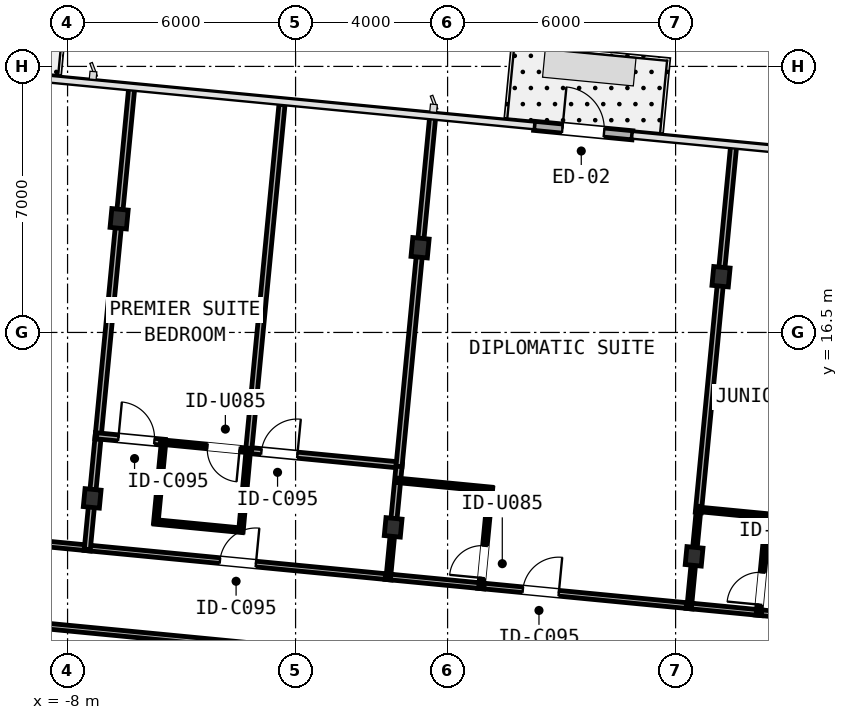
"""IFC4 building model, lengths in metres.
Left out: names, types, materials, properties, quantities, classifications, styles, units other than length and angle.
Written with IfcOpenShell. Run it as: python <this file> out.ifc"""

import sys

from ifc_helpers import new_model, si_unit, direction, frame, frame_2d, origin, origin_2d, place, context, subcontext, project, spatial, rectangle, i_section, extrude, element, fill, save


model = new_model("IFC4")
c1 = context("Model", 3, precision=1e-05, world=origin(), true_north=direction((0.0, 1.0)))
c2 = subcontext(c1, "Body", "Model", "MODEL_VIEW")
j1 = project(units=[si_unit("LENGTHUNIT", "METRE"), si_unit("PLANEANGLEUNIT", "RADIAN")], contexts=[c1])
p1 = place(None, origin())
s1 = spatial("IfcSite", under=j1, at=p1, CompositionType="ELEMENT")
p2 = place(p1, origin())
s2 = spatial("IfcBuilding", under=s1, at=p2, CompositionType="ELEMENT")
p3 = place(p2, frame((0.0, 0.0, 139.35)))
s3 = spatial("IfcBuildingStorey", under=s2, at=p3, CompositionType="ELEMENT", Elevation=139.35)
p4 = place(p3, frame((-7.352, 12.134, 0.0), z_axis=(0.0, 0.0, 1.0), x_axis=(0.995396198367, -0.09584575252, 0.0)))
e1 = element("IfcColumn", 1, at=p4, inside=s3, PredefinedType="COLUMN", context=c2, shape_type="SweptSolid", body=[
    extrude(i_section(OverallWidth=0.424, OverallDepth=0.474, WebThickness=0.048, FlangeThickness=0.077, FilletRadius=0.031, at=origin_2d()), origin(), (0.0, 0.0, 1.0), 3.45),
])
p5 = place(p3, frame((-6.643, 19.492, 0.0), z_axis=(0.0, 0.0, 1.0), x_axis=(0.995396198367, -0.09584575252, 0.0)))
e2 = element("IfcColumn", 2, at=p5, inside=s3, PredefinedType="COLUMN", context=c2, shape_type="SweptSolid", body=[
    extrude(i_section(OverallWidth=0.432, OverallDepth=0.498, WebThickness=0.056, FlangeThickness=0.089, FilletRadius=0.031, at=origin_2d()), origin(), (0.0, 0.0, 1.0), 3.45),
])
p6 = place(p3, frame((0.568, 11.371, 0.0), z_axis=(0.0, 0.0, 1.0), x_axis=(0.995396198367, -0.09584575252, 0.0)))
e3 = element("IfcColumn", 3, at=p6, inside=s3, PredefinedType="COLUMN", context=c2, shape_type="SweptSolid", body=[
    extrude(i_section(OverallWidth=0.424, OverallDepth=0.474, WebThickness=0.048, FlangeThickness=0.077, FilletRadius=0.031, at=origin_2d()), origin(), (0.0, 0.0, 1.0), 3.45),
])
p7 = place(p3, frame((1.276, 18.729, 0.0), z_axis=(0.0, 0.0, 1.0), x_axis=(0.995396198367, -0.09584575252, 0.0)))
e4 = element("IfcColumn", 4, at=p7, inside=s3, PredefinedType="COLUMN", context=c2, shape_type="SweptSolid", body=[
    extrude(i_section(OverallWidth=0.432, OverallDepth=0.498, WebThickness=0.056, FlangeThickness=0.089, FilletRadius=0.031, at=origin_2d()), origin(), (0.0, 0.0, 1.0), 3.45),
])
p8 = place(p3, frame((8.487, 10.609, 0.0), z_axis=(0.0, 0.0, 1.0), x_axis=(0.995396198367, -0.09584575252, 0.0)))
e5 = element("IfcColumn", 5, at=p8, inside=s3, PredefinedType="COLUMN", context=c2, shape_type="SweptSolid", body=[
    extrude(i_section(OverallWidth=0.424, OverallDepth=0.474, WebThickness=0.048, FlangeThickness=0.077, FilletRadius=0.031, at=origin_2d()), origin(), (0.0, 0.0, 1.0), 3.45),
])
p9 = place(p3, frame((9.195, 17.967, 0.0), z_axis=(0.0, 0.0, 1.0), x_axis=(0.995396198367, -0.09584575252, 0.0)))
e6 = element("IfcColumn", 6, at=p9, inside=s3, PredefinedType="COLUMN", context=c2, shape_type="SweptSolid", body=[
    extrude(i_section(OverallWidth=0.432, OverallDepth=0.498, WebThickness=0.056, FlangeThickness=0.089, FilletRadius=0.031, at=origin_2d()), origin(), (0.0, 0.0, 1.0), 3.45),
])
p10 = place(p3, frame((4.275, 21.937, 0.0), z_axis=(0.0, 0.0, 1.0), x_axis=(0.995394049959, -0.095868061976, 0.0)))
e7 = element("IfcWall", 7, at=p10, inside=s3, PredefinedType="STANDARD", context=c2, shape_type="SweptSolid", body=[
    extrude(rectangle(XDim=2.6, YDim=0.24, at=frame_2d((1.3, 0.0))), origin(), (0.0, 0.0, 1.0), 3.19),
])
p11 = place(p10, frame((0.75, 0.0, 0.0)))
e8 = element("IfcOpeningElement", 8, at=p11, cuts=e7, PredefinedType="OPENING", context=c2, shape_type="SweptSolid", body=[
    extrude(rectangle(XDim=1.1, YDim=2.15, at=frame_2d((0.55, 1.075))), frame((0.0, 0.13, 0.0), z_axis=(0.0, -1.0, 0.0), x_axis=(1.0, 0.0, 0.0)), (0.0, 0.0, 1.0), 0.26),
])
p12 = place(p3, frame((-13.04, 11.367, 0.0), z_axis=(0.0, 0.0, 1.0), x_axis=(0.995396240334, -0.095845316679, 0.0)))
e9 = element("IfcWall", 9, at=p12, inside=s3, PredefinedType="PARTITIONING", context=c2, shape_type="SweptSolid", body=[
    extrude(rectangle(XDim=5.67, YDim=0.15, at=frame_2d((2.835, 0.0))), origin(), (0.0, 0.0, 1.0), 2.479),
])
p13 = place(p12, frame((1.186, 0.0, 0.0)))
e10 = element("IfcOpeningElement", 10, at=p13, cuts=e9, PredefinedType="OPENING", context=c2, shape_type="SweptSolid", body=[
    extrude(rectangle(XDim=0.95, YDim=2.15, at=frame_2d((0.475, 1.075))), frame((0.0, 0.085, 0.0), z_axis=(0.0, -1.0, 0.0), x_axis=(1.0, 0.0, 0.0)), (0.0, 0.0, 1.0), 0.17),
])
p14 = place(p3, frame((-7.559, 10.84, 0.0), z_axis=(0.0, 0.0, 1.0), x_axis=(0.995395467524, -0.095853342309, 0.0)))
e11 = element("IfcWall", 11, at=p14, inside=s3, PredefinedType="PARTITIONING", context=c2, shape_type="SweptSolid", body=[
    extrude(rectangle(XDim=8.12, YDim=0.15, at=frame_2d((4.06, 0.0))), origin(), (0.0, 0.0, 1.0), 2.479),
])
p15 = place(p14, frame((3.585, 0.0, 0.0)))
e12 = element("IfcOpeningElement", 12, at=p15, cuts=e11, PredefinedType="OPENING", context=c2, shape_type="SweptSolid", body=[
    extrude(rectangle(XDim=0.95, YDim=2.15, at=frame_2d((0.475, 1.075))), frame((0.0, 0.085, 0.0), z_axis=(0.0, -1.0, 0.0), x_axis=(1.0, 0.0, 0.0)), (0.0, 0.0, 1.0), 0.17),
])
p16 = place(p3, frame((2.799, 9.842, 0.0), z_axis=(0.0, 0.0, 1.0), x_axis=(0.995395844771, -0.095849424686, 0.0)))
e13 = element("IfcWall", 13, at=p16, inside=s3, PredefinedType="PARTITIONING", context=c2, shape_type="SweptSolid", body=[
    extrude(rectangle(XDim=5.67, YDim=0.15, at=frame_2d((2.835, 0.0))), origin(), (0.0, 0.0, 1.0), 2.479),
])
p17 = place(p16, frame((1.186, 0.0, 0.0)))
e14 = element("IfcOpeningElement", 14, at=p17, cuts=e13, PredefinedType="OPENING", context=c2, shape_type="SweptSolid", body=[
    extrude(rectangle(XDim=0.95, YDim=2.15, at=frame_2d((0.475, 1.075))), frame((0.0, 0.085, 0.0), z_axis=(0.0, -1.0, 0.0), x_axis=(1.0, 0.0, 0.0)), (0.0, 0.0, 1.0), 0.17),
])
p18 = place(p3, frame((0.361, 10.077, 0.0), z_axis=(0.0, 0.0, 1.0), x_axis=(0.995397556197, -0.095831649869, 0.0)))
e15 = element("IfcWall", 15, at=p18, inside=s3, PredefinedType="PARTITIONING", context=c2, shape_type="SweptSolid", body=[
    extrude(rectangle(XDim=2.614, YDim=0.15, at=frame_2d((1.307, 0.0))), origin(), (0.0, 0.0, 1.0), 2.479),
])
p19 = place(p3, frame((10.101, 9.139, 0.0), z_axis=(0.0, 0.0, 1.0), x_axis=(0.995393345625, -0.095875374756, 0.0)))
e16 = element("IfcWall", 16, at=p19, inside=s3, PredefinedType="PARTITIONING", context=c2, shape_type="SweptSolid", body=[
    extrude(rectangle(XDim=2.312, YDim=0.15, at=frame_2d((1.156, 0.0))), origin(), (0.0, 0.0, 1.0), 2.718),
])
p20 = place(p19, frame((1.056, 0.0, 0.0)))
e17 = element("IfcOpeningElement", 17, at=p20, cuts=e16, PredefinedType="OPENING", context=c2, shape_type="SweptSolid", body=[
    extrude(rectangle(XDim=0.95, YDim=2.15, at=frame_2d((0.475, 1.075))), frame((0.0, 0.085, 0.0), z_axis=(0.0, -1.0, 0.0), x_axis=(1.0, 0.0, 0.0)), (0.0, 0.0, 1.0), 0.17),
])
p21 = place(p3, frame((8.28, 9.314, 0.0), z_axis=(0.0, 0.0, 1.0), x_axis=(0.995393086543, -0.095878064554, 0.0)))
e18 = element("IfcWall", 18, at=p21, inside=s3, PredefinedType="PARTITIONING", context=c2, shape_type="SweptSolid", body=[
    extrude(rectangle(XDim=1.994, YDim=0.15, at=frame_2d((0.997, 0.0))), origin(), (0.0, 0.0, 1.0), 2.479),
])
p22 = place(p3, frame((3.121, 7.651, 0.0), z_axis=(0.0, 0.0, 1.0), x_axis=(-0.995397135603, 0.095836018457, 0.0)))
e19 = element("IfcWall", 19, at=p22, inside=s3, PredefinedType="PARTITIONING", context=c2, shape_type="SweptSolid", body=[
    extrude(rectangle(XDim=18.892, YDim=0.15, at=frame_2d((9.446, 0.0))), origin(), (0.0, 0.0, 1.0), 2.479),
])
p23 = place(p22, frame((14.502, 0.0, 0.0)))
e20 = element("IfcOpeningElement", 20, at=p23, cuts=e19, PredefinedType="OPENING", context=c2, shape_type="SweptSolid", body=[
    extrude(rectangle(XDim=0.95, YDim=2.15, at=frame_2d((0.475, 1.075))), frame((0.0, 0.085, 0.0), z_axis=(0.0, -1.0, 0.0), x_axis=(1.0, 0.0, 0.0)), (0.0, 0.0, 1.0), 0.17),
])
p24 = place(p3, frame((-7.369, 11.958, 0.0), z_axis=(0.0, 0.0, 1.0), x_axis=(-0.095831494917, -0.995397571115, 0.0)))
e21 = element("IfcWall", 21, at=p24, inside=s3, PredefinedType="PARTITIONING", context=c2, shape_type="SweptSolid", body=[
    extrude(rectangle(XDim=1.172, YDim=0.16, at=frame_2d((0.586, 0.0))), origin(), (0.0, 0.0, 1.0), 2.479),
])
p25 = place(p3, frame((-7.186, 13.858, 0.0), z_axis=(0.0, 0.0, 1.0), x_axis=(-0.095867871334, -0.99539406832, 0.0)))
e22 = element("IfcWall", 22, at=p25, inside=s3, PredefinedType="PARTITIONING", context=c2, shape_type="SweptSolid", body=[
    extrude(rectangle(XDim=1.556, YDim=0.16, at=frame_2d((0.778, 0.0))), origin(), (0.0, 0.0, 1.0), 2.479),
])
p26 = place(p3, frame((-6.66, 19.316, 0.0), z_axis=(0.0, 0.0, 1.0), x_axis=(-0.095877964448, -0.995393096185, 0.0)))
e23 = element("IfcWall", 23, at=p26, inside=s3, PredefinedType="PARTITIONING", context=c2, shape_type="SweptSolid", body=[
    extrude(rectangle(XDim=5.648, YDim=0.16, at=frame_2d((2.824, 0.0))), origin(), (0.0, 0.0, 1.0), 2.479),
])
p27 = place(p3, frame((-6.306, 22.995, 0.0), z_axis=(0.0, 0.0, 1.0), x_axis=(-0.095859866796, -0.995394839216, 0.0)))
e24 = element("IfcWall", 24, at=p27, inside=s3, PredefinedType="PARTITIONING", context=c2, shape_type="SweptSolid", body=[
    extrude(rectangle(XDim=3.344, YDim=0.16, at=frame_2d((1.672, 0.0))), origin(), (0.0, 0.0, 1.0), 3.19),
])
p28 = place(p3, frame((-7.233, 13.78, 0.0), z_axis=(0.0, 0.0, 1.0), x_axis=(0.995392932756, -0.095879661139, 0.0)))
e25 = element("IfcWall", 25, at=p28, inside=s3, PredefinedType="PARTITIONING", context=c2, shape_type="SweptSolid", body=[
    extrude(rectangle(XDim=1.808, YDim=0.16, at=frame_2d((0.904, 0.0))), origin(), (0.0, 0.0, 1.0), 2.479),
])
p29 = place(p28, frame((0.574, 0.0, 0.0)))
e26 = element("IfcOpeningElement", 26, at=p29, cuts=e25, PredefinedType="OPENING", context=c2, shape_type="SweptSolid", body=[
    extrude(rectangle(XDim=0.95, YDim=2.15, at=frame_2d((0.475, 1.075))), frame((0.0, 0.09, 0.0), z_axis=(0.0, -1.0, 0.0), x_axis=(1.0, 0.0, 0.0)), (0.0, 0.0, 1.0), 0.18),
])
p30 = place(p3, frame((-3.284, 13.4, 0.0), z_axis=(0.0, 0.0, 1.0), x_axis=(0.995395934192, -0.095848496045, 0.0)))
e27 = element("IfcWall", 27, at=p30, inside=s3, PredefinedType="PARTITIONING", context=c2, shape_type="SweptSolid", body=[
    extrude(rectangle(XDim=4.068, YDim=0.16, at=frame_2d((2.034, 0.0))), origin(), (0.0, 0.0, 1.0), 2.479),
])
p31 = place(p30, frame((0.386, 0.0, 0.0)))
e28 = element("IfcOpeningElement", 28, at=p31, cuts=e27, PredefinedType="OPENING", context=c2, shape_type="SweptSolid", body=[
    extrude(rectangle(XDim=0.95, YDim=2.15, at=frame_2d((0.475, 1.075))), frame((0.0, 0.09, 0.0), z_axis=(0.0, -1.0, 0.0), x_axis=(1.0, 0.0, 0.0)), (0.0, 0.0, 1.0), 0.18),
])
p32 = place(p3, frame((-5.47, 13.65, 0.0), z_axis=(0.0, 0.0, 1.0), x_axis=(-0.095846349626, -0.995396140872, 0.0)))
e29 = element("IfcWall", 29, at=p32, inside=s3, PredefinedType="PARTITIONING", context=c2, shape_type="SweptSolid", body=[
    extrude(rectangle(XDim=2.188, YDim=0.12, at=frame_2d((1.094, 0.0))), origin(), (0.0, 0.0, 1.0), 2.479),
])
p33 = place(p3, frame((-5.716, 11.516, 0.0), z_axis=(0.0, 0.0, 1.0), x_axis=(0.995393658532, -0.095872126059, 0.0)))
e30 = element("IfcWall", 30, at=p33, inside=s3, PredefinedType="PARTITIONING", context=c2, shape_type="SweptSolid", body=[
    extrude(rectangle(XDim=2.33, YDim=0.12, at=frame_2d((1.165, 0.0))), origin(), (0.0, 0.0, 1.0), 2.718),
])
p34 = place(p3, frame((-3.44, 11.257, 0.0), z_axis=(0.0, 0.0, 1.0), x_axis=(0.091159469261, 0.995836307414, 0.0)))
e31 = element("IfcWall", 31, at=p34, inside=s3, PredefinedType="PARTITIONING", context=c2, shape_type="SweptSolid", body=[
    extrude(rectangle(XDim=2.188, YDim=0.12, at=frame_2d((1.094, 0.0))), origin(), (0.0, 0.0, 1.0), 2.479),
])
p35 = place(p3, frame((0.729, 13.053, 0.0), z_axis=(0.0, 0.0, 1.0), x_axis=(-0.095783075571, -0.995402231479, 0.0)))
e32 = element("IfcWall", 32, at=p35, inside=s3, PredefinedType="PARTITIONING", context=c2, shape_type="SweptSolid", body=[
    extrude(rectangle(XDim=1.514, YDim=0.16, at=frame_2d((0.757, 0.0))), origin(), (0.0, 0.0, 1.0), 2.479),
])
p36 = place(p3, frame((0.551, 11.196, 0.0), z_axis=(0.0, 0.0, 1.0), x_axis=(-0.096017994315, -0.995379598328, 0.0)))
e33 = element("IfcWall", 33, at=p36, inside=s3, PredefinedType="PARTITIONING", context=c2, shape_type="SweptSolid", body=[
    extrude(rectangle(XDim=1.172, YDim=0.12, at=frame_2d((0.586, 0.0))), origin(), (0.0, 0.0, 1.0), 2.479),
])
p37 = place(p3, frame((-2.358, 22.495, 0.0), z_axis=(0.0, 0.0, 1.0), x_axis=(-0.095827921947, -0.995397915095, 0.0)))
e34 = element("IfcWall", 34, at=p37, inside=s3, PredefinedType="PARTITIONING", context=c2, shape_type="SweptSolid", body=[
    extrude(rectangle(XDim=9.182, YDim=0.16, at=frame_2d((4.591, 0.0))), origin(), (0.0, 0.0, 1.0), 2.557),
])
p38 = place(p3, frame((-3.194, 13.391, 0.0), z_axis=(0.0, 0.0, 1.0), x_axis=(-0.995388451302, 0.095926174813, 0.0)))
e35 = element("IfcWall", 35, at=p38, inside=s3, PredefinedType="PARTITIONING", context=c2, shape_type="SweptSolid", body=[
    extrude(rectangle(XDim=2.372, YDim=0.12, at=frame_2d((1.186, 0.0))), origin(), (0.0, 0.0, 1.0), 2.718),
])
p39 = place(p38, frame((0.28, 0.0, 0.0)))
e36 = element("IfcOpeningElement", 36, at=p39, cuts=e35, PredefinedType="OPENING", context=c2, shape_type="SweptSolid", body=[
    extrude(rectangle(XDim=0.85, YDim=2.1, at=frame_2d((0.425, 1.05))), frame((0.0, 0.07, 0.0), z_axis=(0.0, -1.0, 0.0), x_axis=(1.0, 0.0, 0.0)), (0.0, 0.0, 1.0), 0.14),
])
p40 = place(p3, frame((1.259, 18.554, 0.0), z_axis=(0.0, 0.0, 1.0), x_axis=(-0.095807834241, -0.995399848753, 0.0)))
e37 = element("IfcWall", 37, at=p40, inside=s3, PredefinedType="PARTITIONING", context=c2, shape_type="SweptSolid", body=[
    extrude(rectangle(XDim=5.606, YDim=0.16, at=frame_2d((2.803, 0.0))), origin(), (0.0, 0.0, 1.0), 2.479),
])
p41 = place(p3, frame((1.613, 22.233, 0.0), z_axis=(0.0, 0.0, 1.0), x_axis=(-0.095787528641, -0.99540180297, 0.0)))
e38 = element("IfcWall", 38, at=p41, inside=s3, PredefinedType="PARTITIONING", context=c2, shape_type="SweptSolid", body=[
    extrude(rectangle(XDim=3.344, YDim=0.16, at=frame_2d((1.672, 0.0))), origin(), (0.0, 0.0, 1.0), 3.19),
])
p42 = place(p3, frame((2.877, 9.794, 0.0), z_axis=(0.0, 0.0, 1.0), x_axis=(0.095891053428, 0.995391835345, 0.0)))
e39 = element("IfcWall", 39, at=p42, inside=s3, PredefinedType="PARTITIONING", context=c2, shape_type="SweptSolid", body=[
    extrude(rectangle(XDim=2.63, YDim=0.12, at=frame_2d((1.315, 0.0))), origin(), (0.0, 0.0, 1.0), 2.479),
])
p43 = place(p42, frame((0.247, 0.0, 0.0)))
e40 = element("IfcOpeningElement", 40, at=p43, cuts=e39, PredefinedType="OPENING", context=c2, shape_type="SweptSolid", body=[
    extrude(rectangle(XDim=0.85, YDim=2.1, at=frame_2d((0.425, 1.05))), frame((0.0, 0.07, 0.0), z_axis=(0.0, -1.0, 0.0), x_axis=(1.0, 0.0, 0.0)), (0.0, 0.0, 1.0), 0.14),
])
p44 = place(p3, frame((3.165, 12.369, 0.0), z_axis=(0.0, 0.0, 1.0), x_axis=(-0.995389028655, 0.095920183663, 0.0)))
e41 = element("IfcWall", 41, at=p44, inside=s3, PredefinedType="PARTITIONING", context=c2, shape_type="SweptSolid", body=[
    extrude(rectangle(XDim=2.53, YDim=0.12, at=frame_2d((1.265, 0.0))), origin(), (0.0, 0.0, 1.0), 2.479),
])
p45 = place(p3, frame((9.178, 17.791, 0.0), z_axis=(0.0, 0.0, 1.0), x_axis=(-0.095826863488, -0.995398016993, 0.0)))
e42 = element("IfcWall", 42, at=p45, inside=s3, PredefinedType="PARTITIONING", context=c2, shape_type="SweptSolid", body=[
    extrude(rectangle(XDim=6.056, YDim=0.16, at=frame_2d((3.028, 0.0))), origin(), (0.0, 0.0, 1.0), 2.479),
])
p46 = place(p3, frame((9.533, 21.47, 0.0), z_axis=(0.0, 0.0, 1.0), x_axis=(-0.095859866796, -0.995394839216, 0.0)))
e43 = element("IfcWall", 43, at=p46, inside=s3, PredefinedType="PARTITIONING", context=c2, shape_type="SweptSolid", body=[
    extrude(rectangle(XDim=3.344, YDim=0.16, at=frame_2d((1.672, 0.0))), origin(), (0.0, 0.0, 1.0), 3.19),
])
p47 = place(p3, frame((8.47, 10.433, 0.0), z_axis=(0.0, 0.0, 1.0), x_axis=(-0.095831494917, -0.995397571115, 0.0)))
e44 = element("IfcWall", 44, at=p47, inside=s3, PredefinedType="PARTITIONING", context=c2, shape_type="SweptSolid", body=[
    extrude(rectangle(XDim=1.172, YDim=0.12, at=frame_2d((0.586, 0.0))), origin(), (0.0, 0.0, 1.0), 2.479),
])
p48 = place(p3, frame((8.614, 11.927, 0.0), z_axis=(0.0, 0.0, 1.0), x_axis=(-0.09590284245, -0.99539069958, 0.0)))
e45 = element("IfcWall", 45, at=p48, inside=s3, PredefinedType="PARTITIONING", context=c2, shape_type="SweptSolid", body=[
    extrude(rectangle(XDim=1.148, YDim=0.12, at=frame_2d((0.574, 0.0))), origin(), (0.0, 0.0, 1.0), 2.479),
])
p49 = place(p3, frame((10.179, 9.091, 0.0), z_axis=(0.0, 0.0, 1.0), x_axis=(0.095799078022, 0.995400691506, 0.0)))
e46 = element("IfcWall", 46, at=p49, inside=s3, PredefinedType="PARTITIONING", context=c2, shape_type="SweptSolid", body=[
    extrude(rectangle(XDim=2.63, YDim=0.12, at=frame_2d((1.315, 0.0))), origin(), (0.0, 0.0, 1.0), 2.479),
])
p50 = place(p49, frame((0.247, 0.0, 0.0)))
e47 = element("IfcOpeningElement", 47, at=p50, cuts=e46, PredefinedType="OPENING", context=c2, shape_type="SweptSolid", body=[
    extrude(rectangle(XDim=0.85, YDim=2.1, at=frame_2d((0.425, 1.05))), frame((0.0, 0.07, 0.0), z_axis=(0.0, -1.0, 0.0), x_axis=(1.0, 0.0, 0.0)), (0.0, 0.0, 1.0), 0.14),
])
p51 = place(p3, frame((10.467, 11.666, 0.0), z_axis=(0.0, 0.0, 1.0), x_axis=(-0.995405983929, 0.095744071139, 0.0)))
e48 = element("IfcWall", 48, at=p51, inside=s3, PredefinedType="PARTITIONING", context=c2, shape_type="SweptSolid", body=[
    extrude(rectangle(XDim=1.91, YDim=0.12, at=frame_2d((0.955, 0.0))), origin(), (0.0, 0.0, 1.0), 2.479),
])
p52 = place(p11, origin())
e49 = element("IfcDoor", 49, at=p52, inside=s3, OperationType="SINGLE_SWING_LEFT", PredefinedType="DOOR", context=c2, shape_type="SweptSolid", body=[
    extrude(rectangle(XDim=1.1, YDim=2.15, at=frame_2d((0.55, 1.075))), frame((0.0, 0.025, 0.0), z_axis=(0.0, -1.0, 0.0), x_axis=(1.0, 0.0, 0.0)), (0.0, 0.0, 1.0), 0.05),
])
fill(e8, e49)
p53 = place(p15, frame((0.95, 0.0, 0.0), z_axis=(0.0, 0.0, 1.0), x_axis=(-1.0, 0.0, 0.0)))
e50 = element("IfcDoor", 50, at=p53, inside=s3, OperationType="SINGLE_SWING_RIGHT", PredefinedType="DOOR", context=c2, shape_type="SweptSolid", body=[
    extrude(rectangle(XDim=0.95, YDim=2.15, at=frame_2d((0.475, 1.075))), frame((0.0, 0.025, 0.0), z_axis=(0.0, -1.0, 0.0), x_axis=(1.0, 0.0, 0.0)), (0.0, 0.0, 1.0), 0.05),
])
fill(e12, e50)
p54 = place(p29, origin())
e51 = element("IfcDoor", 51, at=p54, inside=s3, OperationType="SINGLE_SWING_LEFT", PredefinedType="DOOR", context=c2, shape_type="SweptSolid", body=[
    extrude(rectangle(XDim=0.95, YDim=2.15, at=frame_2d((0.475, 1.075))), frame((0.0, 0.025, 0.0), z_axis=(0.0, -1.0, 0.0), x_axis=(1.0, 0.0, 0.0)), (0.0, 0.0, 1.0), 0.05),
])
fill(e26, e51)
p55 = place(p31, origin())
e52 = element("IfcDoor", 52, at=p55, inside=s3, OperationType="SINGLE_SWING_RIGHT", PredefinedType="DOOR", context=c2, shape_type="SweptSolid", body=[
    extrude(rectangle(XDim=0.95, YDim=2.15, at=frame_2d((0.475, 1.075))), frame((0.0, 0.025, 0.0), z_axis=(0.0, -1.0, 0.0), x_axis=(1.0, 0.0, 0.0)), (0.0, 0.0, 1.0), 0.05),
])
fill(e28, e52)
p56 = place(p39, frame((0.85, 0.0, 0.0), z_axis=(0.0, 0.0, 1.0), x_axis=(-1.0, 0.0, 0.0)))
e53 = element("IfcDoor", 53, at=p56, inside=s3, OperationType="SINGLE_SWING_LEFT", PredefinedType="DOOR", context=c2, shape_type="SweptSolid", body=[
    extrude(rectangle(XDim=0.85, YDim=2.1, at=frame_2d((0.425, 1.05))), frame((0.0, 0.025, 0.0), z_axis=(0.0, -1.0, 0.0), x_axis=(1.0, 0.0, 0.0)), (0.0, 0.0, 1.0), 0.05),
])
fill(e36, e53)
p57 = place(p17, frame((0.95, 0.0, 0.0), z_axis=(0.0, 0.0, 1.0), x_axis=(-1.0, 0.0, 0.0)))
e54 = element("IfcDoor", 54, at=p57, inside=s3, OperationType="SINGLE_SWING_RIGHT", PredefinedType="DOOR", context=c2, shape_type="SweptSolid", body=[
    extrude(rectangle(XDim=0.95, YDim=2.15, at=frame_2d((0.475, 1.075))), frame((0.0, 0.025, 0.0), z_axis=(0.0, -1.0, 0.0), x_axis=(1.0, 0.0, 0.0)), (0.0, 0.0, 1.0), 0.05),
])
fill(e14, e54)
p58 = place(p43, frame((0.85, 0.0, 0.0), z_axis=(0.0, 0.0, 1.0), x_axis=(-1.0, 0.0, 0.0)))
e55 = element("IfcDoor", 55, at=p58, inside=s3, OperationType="SINGLE_SWING_LEFT", PredefinedType="DOOR", context=c2, shape_type="SweptSolid", body=[
    extrude(rectangle(XDim=0.85, YDim=2.1, at=frame_2d((0.425, 1.05))), frame((0.0, 0.025, 0.0), z_axis=(0.0, -1.0, 0.0), x_axis=(1.0, 0.0, 0.0)), (0.0, 0.0, 1.0), 0.05),
])
fill(e40, e55)
p59 = place(p50, frame((0.85, 0.0, 0.0), z_axis=(0.0, 0.0, 1.0), x_axis=(-1.0, 0.0, 0.0)))
e56 = element("IfcDoor", 56, at=p59, inside=s3, OperationType="SINGLE_SWING_LEFT", PredefinedType="DOOR", context=c2, shape_type="SweptSolid", body=[
    extrude(rectangle(XDim=0.85, YDim=2.1, at=frame_2d((0.425, 1.05))), frame((0.0, 0.025, 0.0), z_axis=(0.0, -1.0, 0.0), x_axis=(1.0, 0.0, 0.0)), (0.0, 0.0, 1.0), 0.05),
])
fill(e47, e56)
save(model, sys.argv[1])
